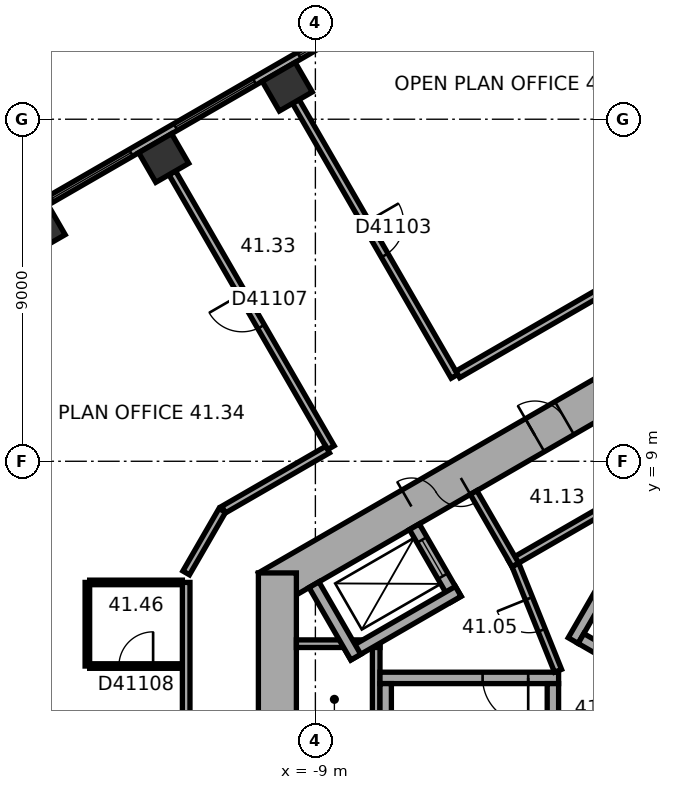
"""IFC4 building model, lengths in metres.
Left out: names, types, materials, properties, quantities, classifications, styles, units other than length and angle.
Written with IfcOpenShell. Run it as: python <this file> out.ifc"""

import sys

from ifc_helpers import new_model, si_unit, direction, frame, frame_2d, origin, origin_2d, place, context, subcontext, project, spatial, rectangle, extrude, element, fill, save


model = new_model("IFC4")
c1 = context("Model", 3, precision=1e-05, world=origin(), true_north=direction((0.0, 1.0)))
c2 = subcontext(c1, "Body", "Model", "MODEL_VIEW")
j1 = project(units=[si_unit("LENGTHUNIT", "METRE"), si_unit("PLANEANGLEUNIT", "RADIAN")], contexts=[c1])
p1 = place(None, origin())
s1 = spatial("IfcSite", under=j1, at=p1, CompositionType="ELEMENT")
p2 = place(p1, origin())
s2 = spatial("IfcBuilding", under=s1, at=p2, CompositionType="ELEMENT")
p3 = place(p2, frame((0.0, 0.0, 168.8)))
s3 = spatial("IfcBuildingStorey", under=s2, at=p3, CompositionType="ELEMENT", Elevation=168.8)
for number, where, z_axis, x_axis in (
    (1, (-9.74, 18.856, 0.0), (0.0, 0.0, 1.0), (-0.866, -0.5, 0.0)),
    (2, (-12.991, 16.979, 0.0), (0.0, 0.0, 1.0), (-0.866, -0.5, 0.0)),
    (3, (-16.242, 15.102, 0.0), (0.0, 0.0, 1.0), (-0.866, -0.5, 0.0)),
):
    element("IfcColumn", number, at=place(p3, frame(where, z_axis=z_axis, x_axis=x_axis)), inside=s3, PredefinedType="COLUMN", context=c2, shape_type="SweptSolid", body=[
        extrude(rectangle(XDim=1.0, YDim=0.9, at=origin_2d()), origin(), (0.0, 0.0, 1.0), 3.7),
    ])
p4 = place(p3, frame((0.25, 11.691, 0.0), z_axis=(0.0, 0.0, 1.0), x_axis=(-0.866022616891, -0.50000482701, 0.0)))
e4 = element("IfcWall", 4, at=p4, inside=s3, PredefinedType="SHEAR", context=c2, shape_type="SweptSolid", body=[
    extrude(rectangle(XDim=12.125, YDim=1.0, at=frame_2d((6.062, 0.0))), origin(), (0.0, 0.0, 1.0), 3.7),
])
p5 = place(p4, frame((6.262, 0.0, 0.0)))
e5 = element("IfcOpeningElement", 5, at=p5, cuts=e4, PredefinedType="OPENING", context=c2, shape_type="SweptSolid", body=[
    extrude(rectangle(XDim=1.5, YDim=2.1, at=frame_2d((0.75, 1.05))), frame((0.0, 0.51, 0.0), z_axis=(0.0, -1.0, 0.0), x_axis=(1.0, 0.0, 0.0)), (0.0, 0.0, 1.0), 1.02),
])
p6 = place(p4, frame((3.112, 0.0, 0.0)))
e6 = element("IfcOpeningElement", 6, at=p6, cuts=e4, PredefinedType="OPENING", context=c2, shape_type="SweptSolid", body=[
    extrude(rectangle(XDim=0.9, YDim=2.1, at=frame_2d((0.45, 1.05))), frame((0.0, 0.51, 0.0), z_axis=(0.0, -1.0, 0.0), x_axis=(1.0, 0.0, 0.0)), (0.0, 0.0, 1.0), 1.02),
])
p7 = place(p3, frame((-10.0, 6.062, 0.0), z_axis=(0.0, 0.0, 1.0), x_axis=(0.0, -1.0, 0.0)))
e7 = element("IfcWall", 7, at=p7, inside=s3, PredefinedType="SHEAR", context=c2, shape_type="SweptSolid", body=[
    extrude(rectangle(XDim=12.125, YDim=1.0, at=frame_2d((6.062, 0.0))), origin(), (0.0, 0.0, 1.0), 3.7),
])
p8 = place(p7, frame((5.212, 0.0, 0.0)))
e8 = element("IfcOpeningElement", 8, at=p8, cuts=e7, PredefinedType="OPENING", context=c2, shape_type="SweptSolid", body=[
    extrude(rectangle(XDim=1.1, YDim=2.1, at=frame_2d((0.55, 1.05))), frame((0.0, 0.51, 0.0), z_axis=(0.0, -1.0, 0.0), x_axis=(1.0, 0.0, 0.0)), (0.0, 0.0, 1.0), 1.02),
])
p9 = place(p7, frame((7.812, 0.0, 0.0)))
e9 = element("IfcOpeningElement", 9, at=p9, cuts=e7, PredefinedType="OPENING", context=c2, shape_type="SweptSolid", body=[
    extrude(rectangle(XDim=1.1, YDim=2.1, at=frame_2d((0.55, 1.05))), frame((0.0, 0.51, 0.0), z_axis=(0.0, -1.0, 0.0), x_axis=(1.0, 0.0, 0.0)), (0.0, 0.0, 1.0), 1.02),
])
p10 = place(p3, frame((-2.961, 23.405, 0.0), z_axis=(0.0, 0.0, 1.0), x_axis=(-0.866023315909, -0.500003616288, 0.0)))
e10 = element("IfcWall", 10, at=p10, inside=s3, PredefinedType="STANDARD", context=c2, shape_type="SweptSolid", body=[
    extrude(rectangle(XDim=20.044, YDim=0.2, at=frame_2d((10.022, 0.0))), origin(), (0.0, 0.0, 1.0), 3.7),
])
p11 = place(p10, frame((1.314, 0.0, 0.9)))
e11 = element("IfcOpeningElement", 11, at=p11, cuts=e10, PredefinedType="OPENING", context=c2, shape_type="SweptSolid", body=[
    extrude(rectangle(XDim=2.4, YDim=2.0, at=frame_2d((1.2, 1.0))), frame((0.0, 0.11, 0.0), z_axis=(0.0, -1.0, 0.0), x_axis=(1.0, 0.0, 0.0)), (0.0, 0.0, 1.0), 0.22),
])
p12 = place(p10, frame((5.069, 0.0, 0.9)))
e12 = element("IfcOpeningElement", 12, at=p12, cuts=e10, PredefinedType="OPENING", context=c2, shape_type="SweptSolid", body=[
    extrude(rectangle(XDim=2.4, YDim=2.0, at=frame_2d((1.2, 1.0))), frame((0.0, 0.11, 0.0), z_axis=(0.0, -1.0, 0.0), x_axis=(1.0, 0.0, 0.0)), (0.0, 0.0, 1.0), 0.22),
])
p13 = place(p10, frame((8.823, 0.0, 0.9)))
e13 = element("IfcOpeningElement", 13, at=p13, cuts=e10, PredefinedType="OPENING", context=c2, shape_type="SweptSolid", body=[
    extrude(rectangle(XDim=2.4, YDim=2.0, at=frame_2d((1.2, 1.0))), frame((0.0, 0.11, 0.0), z_axis=(0.0, -1.0, 0.0), x_axis=(1.0, 0.0, 0.0)), (0.0, 0.0, 1.0), 0.22),
])
p14 = place(p10, frame((12.577, 0.0, 0.9)))
e14 = element("IfcOpeningElement", 14, at=p14, cuts=e10, PredefinedType="OPENING", context=c2, shape_type="SweptSolid", body=[
    extrude(rectangle(XDim=2.4, YDim=2.0, at=frame_2d((1.2, 1.0))), frame((0.0, 0.11, 0.0), z_axis=(0.0, -1.0, 0.0), x_axis=(1.0, 0.0, 0.0)), (0.0, 0.0, 1.0), 0.22),
])
p15 = place(p10, frame((16.331, 0.0, 0.9)))
e15 = element("IfcOpeningElement", 15, at=p15, cuts=e10, PredefinedType="OPENING", context=c2, shape_type="SweptSolid", body=[
    extrude(rectangle(XDim=2.4, YDim=2.0, at=frame_2d((1.2, 1.0))), frame((0.0, 0.11, 0.0), z_axis=(0.0, -1.0, 0.0), x_axis=(1.0, 0.0, 0.0)), (0.0, 0.0, 1.0), 0.22),
])
p16 = place(p3, frame((0.803, 9.009, 0.0), z_axis=(0.0, 0.0, 1.0), x_axis=(-0.866028230842, -0.499995103361, 0.0)))
e16 = element("IfcWall", 16, at=p16, inside=s3, PredefinedType="PARTITIONING", context=c2, shape_type="SweptSolid", body=[
    extrude(rectangle(XDim=5.4, YDim=0.2, at=frame_2d((2.7, 0.0))), origin(), (0.0, 0.0, 1.0), 3.42),
])
p17 = place(p3, frame((-3.737, 6.272, 0.0), z_axis=(0.0, 0.0, 1.0), x_axis=(-0.50002983664, 0.866008176907, 0.0)))
e17 = element("IfcWall", 17, at=p17, inside=s3, PredefinedType="PARTITIONING", context=c2, shape_type="SweptSolid", body=[
    extrude(rectangle(XDim=2.2, YDim=0.2, at=frame_2d((1.1, 0.0))), origin(), (0.0, 0.0, 1.0), 3.42),
])
p18 = place(p3, frame((-7.4, 4.3, 0.0), z_axis=(0.0, 0.0, 1.0), x_axis=(0.0, -1.0, 0.0)))
e18 = element("IfcWall", 18, at=p18, inside=s3, PredefinedType="PARTITIONING", context=c2, shape_type="SweptSolid", body=[
    extrude(rectangle(XDim=8.0, YDim=0.2, at=frame_2d((4.0, 0.0))), origin(), (0.0, 0.0, 1.0), 3.42),
])
p19 = place(p3, frame((-7.3, 4.2, 0.0), z_axis=(0.0, 0.0, 1.0), x_axis=(-1.0, 0.0, 0.0)))
e19 = element("IfcWall", 19, at=p19, inside=s3, PredefinedType="PARTITIONING", context=c2, shape_type="SweptSolid", body=[
    extrude(rectangle(XDim=2.2, YDim=0.2, at=frame_2d((1.1, 0.0))), origin(), (0.0, 0.0, 1.0), 3.42),
])
p20 = place(p3, frame((-2.216, 4.282, 0.0), z_axis=(0.0, 0.0, 1.0), x_axis=(0.499977259774, 0.866038532462, 0.0)))
e20 = element("IfcWall", 20, at=p20, inside=s3, PredefinedType="SHEAR", context=c2, shape_type="SweptSolid", body=[
    extrude(rectangle(XDim=4.7, YDim=0.3, at=frame_2d((2.35, 0.0))), origin(), (0.0, 0.0, 1.0), 3.42),
])
p21 = place(p3, frame((4.103, 0.807, 0.0), z_axis=(0.0, 0.0, 1.0), x_axis=(-0.866027801685, 0.499995846692, 0.0)))
e21 = element("IfcWall", 21, at=p21, inside=s3, PredefinedType="SHEAR", context=c2, shape_type="SweptSolid", body=[
    extrude(rectangle(XDim=7.06, YDim=0.3, at=frame_2d((3.53, 0.0))), origin(), (0.0, 0.0, 1.0), 3.42),
])
p22 = place(p3, frame((-2.6, 3.3, 0.0), z_axis=(0.0, 0.0, 1.0), x_axis=(-1.0, 0.0, 0.0)))
e22 = element("IfcWall", 22, at=p22, inside=s3, PredefinedType="SHEAR", context=c2, shape_type="SweptSolid", body=[
    extrude(rectangle(XDim=4.7, YDim=0.3, at=frame_2d((2.35, 0.0))), origin(), (0.0, 0.0, 1.0), 3.42),
])
p23 = place(p22, frame((0.8, 0.0, 0.0)))
e23 = element("IfcOpeningElement", 23, at=p23, cuts=e22, PredefinedType="OPENING", context=c2, shape_type="SweptSolid", body=[
    extrude(rectangle(XDim=1.2, YDim=2.1, at=frame_2d((0.6, 1.05))), frame((0.0, 0.16, 0.0), z_axis=(0.0, -1.0, 0.0), x_axis=(1.0, 0.0, 0.0)), (0.0, 0.0, 1.0), 0.32),
])
for number, where, z_axis, x_axis in (
    (24, (-2.75, 3.15, 0.0), (0.0, 0.0, 1.0), (0.0, -1.0, 0.0)),
    (25, (-7.15, 3.15, 0.0), (0.0, 0.0, 1.0), (0.0, -1.0, 0.0)),
):
    element("IfcWall", number, at=place(p3, frame(where, z_axis=z_axis, x_axis=x_axis)), inside=s3, PredefinedType="SHEAR", context=c2, shape_type="SweptSolid", body=[
        extrude(rectangle(XDim=7.06, YDim=0.3, at=frame_2d((3.53, 0.0))), origin(), (0.0, 0.0, 1.0), 3.42),
    ])
p24 = place(p3, frame((-5.295, 5.372, 0.0), z_axis=(0.0, 0.0, 1.0), x_axis=(-0.500077893725, 0.86598042715, 0.0)))
e26 = element("IfcWall", 26, at=p24, inside=s3, PredefinedType="SHEAR", context=c2, shape_type="SweptSolid", body=[
    extrude(rectangle(XDim=2.2, YDim=0.3, at=frame_2d((1.1, 0.0))), origin(), (0.0, 0.0, 1.0), 3.42),
])
p25 = place(p24, frame((0.7, 0.0, 0.0)))
e27 = element("IfcOpeningElement", 27, at=p25, cuts=e26, PredefinedType="OPENING", context=c2, shape_type="SweptSolid", body=[
    extrude(rectangle(XDim=1.1, YDim=2.1, at=frame_2d((0.55, 1.05))), frame((0.0, 0.16, 0.0), z_axis=(0.0, -1.0, 0.0), x_axis=(1.0, 0.0, 0.0)), (0.0, 0.0, 1.0), 0.32),
])
p26 = place(p3, frame((-5.24, 5.577, 0.0), z_axis=(0.0, 0.0, 1.0), x_axis=(-0.866014461049, -0.500018952895, 0.0)))
e28 = element("IfcWall", 28, at=p26, inside=s3, PredefinedType="SHEAR", context=c2, shape_type="SweptSolid", body=[
    extrude(rectangle(XDim=3.35, YDim=0.3, at=frame_2d((1.675, 0.0))), origin(), (0.0, 0.0, 1.0), 3.42),
])
p27 = place(p3, frame((-7.937, 3.847, 0.0), z_axis=(0.0, 0.0, 1.0), x_axis=(-0.50002983664, 0.866008176907, 0.0)))
e29 = element("IfcWall", 29, at=p27, inside=s3, PredefinedType="SHEAR", context=c2, shape_type="SweptSolid", body=[
    extrude(rectangle(XDim=2.2, YDim=0.3, at=frame_2d((1.1, 0.0))), origin(), (0.0, 0.0, 1.0), 3.42),
])
p28 = place(p3, frame((-2.615, 3.487, 0.0), z_axis=(0.0, 0.0, 1.0), x_axis=(-0.373576831041, 0.92759924068, 0.0)))
e30 = element("IfcWall", 30, at=p28, inside=s3, PredefinedType="PARTITIONING", context=c2, shape_type="SweptSolid", body=[
    extrude(rectangle(XDim=3.002, YDim=0.2, at=frame_2d((1.501, 0.0))), origin(), (0.0, 0.0, 1.0), 3.42),
])
p29 = place(p28, frame((1.15, 0.0, 0.0)))
e31 = element("IfcOpeningElement", 31, at=p29, cuts=e30, PredefinedType="OPENING", context=c2, shape_type="SweptSolid", body=[
    extrude(rectangle(XDim=0.9, YDim=2.1, at=frame_2d((0.45, 1.05))), frame((0.0, 0.11, 0.0), z_axis=(0.0, -1.0, 0.0), x_axis=(1.0, 0.0, 0.0)), (0.0, 0.0, 1.0), 0.22),
])
p30 = place(p3, frame((-15.0, 3.612, 0.0), z_axis=(0.0, 0.0, 1.0), x_axis=(0.0, 1.0, 0.0)))
e32 = element("IfcWall", 32, at=p30, inside=s3, PredefinedType="PARTITIONING", context=c2, shape_type="SweptSolid", body=[
    extrude(rectangle(XDim=2.2, YDim=0.12, at=frame_2d((1.1, 0.0))), origin(), (0.0, 0.0, 1.0), 3.42),
])
p31 = place(p3, frame((-14.94, 5.812, 0.0), z_axis=(0.0, 0.0, 1.0), x_axis=(1.0, 0.0, 0.0)))
e33 = element("IfcWall", 33, at=p31, inside=s3, PredefinedType="PARTITIONING", context=c2, shape_type="SweptSolid", body=[
    extrude(rectangle(XDim=2.44, YDim=0.12, at=frame_2d((1.22, 0.0))), origin(), (0.0, 0.0, 1.0), 3.42),
])
p32 = place(p3, frame((-12.766, 16.589, 0.0), z_axis=(0.0, 0.0, 1.0), x_axis=(0.500010139422, -0.866019549707, 0.0)))
e34 = element("IfcWall", 34, at=p32, inside=s3, PredefinedType="PARTITIONING", context=c2, shape_type="SweptSolid", body=[
    extrude(rectangle(XDim=8.35, YDim=0.2, at=frame_2d((4.175, 0.0))), origin(), (0.0, 0.0, 1.0), 3.42),
])
p33 = place(p32, frame((3.675, 0.0, 0.0)))
e35 = element("IfcOpeningElement", 35, at=p33, cuts=e34, PredefinedType="OPENING", context=c2, shape_type="SweptSolid", body=[
    extrude(rectangle(XDim=1.0, YDim=2.1, at=frame_2d((0.5, 1.05))), frame((0.0, 0.11, 0.0), z_axis=(0.0, -1.0, 0.0), x_axis=(1.0, 0.0, 0.0)), (0.0, 0.0, 1.0), 0.22),
])
p34 = place(p3, frame((-12.5, 3.612, 0.0), z_axis=(0.0, 0.0, 1.0), x_axis=(-1.0, 0.0, 0.0)))
e36 = element("IfcWall", 36, at=p34, inside=s3, PredefinedType="PARTITIONING", context=c2, shape_type="SweptSolid", body=[
    extrude(rectangle(XDim=2.44, YDim=0.12, at=frame_2d((1.22, 0.0))), origin(), (0.0, 0.0, 1.0), 3.42),
])
p35 = place(p34, frame((0.77, 0.0, 0.0)))
e37 = element("IfcOpeningElement", 37, at=p35, cuts=e36, PredefinedType="OPENING", context=c2, shape_type="SweptSolid", body=[
    extrude(rectangle(XDim=0.9, YDim=2.1, at=frame_2d((0.45, 1.05))), frame((0.0, 0.07, 0.0), z_axis=(0.0, -1.0, 0.0), x_axis=(1.0, 0.0, 0.0)), (0.0, 0.0, 1.0), 0.14),
])
p36 = place(p3, frame((-12.4, 5.812, 0.0), z_axis=(0.0, 0.0, 1.0), x_axis=(0.0, -1.0, 0.0)))
e38 = element("IfcWall", 38, at=p36, inside=s3, PredefinedType="PARTITIONING", context=c2, shape_type="SweptSolid", body=[
    extrude(rectangle(XDim=3.611, YDim=0.2, at=frame_2d((1.806, 0.0))), origin(), (0.0, 0.0, 1.0), 3.42),
])
p37 = place(p3, frame((-11.45, 7.708, 0.0), z_axis=(0.0, 0.0, 1.0), x_axis=(-0.500022797313, -0.86601224135, 0.0)))
e39 = element("IfcWall", 39, at=p37, inside=s3, PredefinedType="PARTITIONING", context=c2, shape_type="SweptSolid", body=[
    extrude(rectangle(XDim=1.9, YDim=0.2, at=frame_2d((0.95, 0.0))), origin(), (0.0, 0.0, 1.0), 3.42),
])
p38 = place(p3, frame((-9.515, 18.466, 0.0), z_axis=(0.0, 0.0, 1.0), x_axis=(0.500010139422, -0.866019549707, 0.0)))
e40 = element("IfcWall", 40, at=p38, inside=s3, PredefinedType="PARTITIONING", context=c2, shape_type="SweptSolid", body=[
    extrude(rectangle(XDim=8.35, YDim=0.2, at=frame_2d((4.175, 0.0))), origin(), (0.0, 0.0, 1.0), 2.87),
])
p39 = place(p38, frame((3.675, 0.0, 0.0)))
e41 = element("IfcOpeningElement", 41, at=p39, cuts=e40, PredefinedType="OPENING", context=c2, shape_type="SweptSolid", body=[
    extrude(rectangle(XDim=1.0, YDim=2.1, at=frame_2d((0.5, 1.05))), frame((0.0, 0.11, 0.0), z_axis=(0.0, -1.0, 0.0), x_axis=(1.0, 0.0, 0.0)), (0.0, 0.0, 1.0), 0.22),
])
p40 = place(p3, frame((-8.678, 9.308, 0.0), z_axis=(0.0, 0.0, 1.0), x_axis=(-0.866000359435, -0.500043375578, 0.0)))
e42 = element("IfcWall", 42, at=p40, inside=s3, PredefinedType="PARTITIONING", context=c2, shape_type="SweptSolid", body=[
    extrude(rectangle(XDim=3.161, YDim=0.2, at=frame_2d((1.581, 0.0))), origin(), (0.0, 0.0, 1.0), 3.42),
])
p41 = place(p3, frame((-0.95, 13.77, 0.0), z_axis=(0.0, 0.0, 1.0), x_axis=(-0.866036689987, -0.499980451214, 0.0)))
e43 = element("IfcWall", 43, at=p41, inside=s3, PredefinedType="PARTITIONING", context=c2, shape_type="SweptSolid", body=[
    extrude(rectangle(XDim=4.969, YDim=0.2, at=frame_2d((2.485, 0.0))), origin(), (0.0, 0.0, 1.0), 3.42),
])
p42 = place(p12, origin())
e44 = element("IfcWindow", 44, at=p42, inside=s3, PartitioningType="SINGLE_PANEL", PredefinedType="WINDOW", context=c2, shape_type="SweptSolid", body=[
    extrude(rectangle(XDim=2.4, YDim=2.0, at=frame_2d((1.2, 1.0))), frame((0.0, 0.03, 0.0), z_axis=(0.0, -1.0, 0.0), x_axis=(1.0, 0.0, 0.0)), (0.0, 0.0, 1.0), 0.06),
])
fill(e12, e44)
p43 = place(p13, origin())
e45 = element("IfcWindow", 45, at=p43, inside=s3, PartitioningType="SINGLE_PANEL", PredefinedType="WINDOW", context=c2, shape_type="SweptSolid", body=[
    extrude(rectangle(XDim=2.4, YDim=2.0, at=frame_2d((1.2, 1.0))), frame((0.0, 0.03, 0.0), z_axis=(0.0, -1.0, 0.0), x_axis=(1.0, 0.0, 0.0)), (0.0, 0.0, 1.0), 0.06),
])
fill(e13, e45)
p44 = place(p14, origin())
e46 = element("IfcWindow", 46, at=p44, inside=s3, PartitioningType="SINGLE_PANEL", PredefinedType="WINDOW", context=c2, shape_type="SweptSolid", body=[
    extrude(rectangle(XDim=2.4, YDim=2.0, at=frame_2d((1.2, 1.0))), frame((0.0, 0.03, 0.0), z_axis=(0.0, -1.0, 0.0), x_axis=(1.0, 0.0, 0.0)), (0.0, 0.0, 1.0), 0.06),
])
fill(e14, e46)
p45 = place(p5, origin())
e47 = element("IfcDoor", 47, at=p45, inside=s3, OperationType="DOUBLE_DOOR_SINGLE_SWING", PredefinedType="DOOR", context=c2, shape_type="SweptSolid", body=[
    extrude(rectangle(XDim=1.5, YDim=2.1, at=frame_2d((0.75, 1.05))), frame((0.0, 0.025, 0.0), z_axis=(0.0, -1.0, 0.0), x_axis=(1.0, 0.0, 0.0)), (0.0, 0.0, 1.0), 0.05),
])
fill(e5, e47)
p46 = place(p23, origin())
e48 = element("IfcDoor", 48, at=p46, inside=s3, OperationType="SINGLE_SWING_RIGHT", PredefinedType="DOOR", context=c2, shape_type="SweptSolid", body=[
    extrude(rectangle(XDim=1.2, YDim=2.1, at=frame_2d((0.6, 1.05))), frame((0.0, 0.025, 0.0), z_axis=(0.0, -1.0, 0.0), x_axis=(1.0, 0.0, 0.0)), (0.0, 0.0, 1.0), 0.05),
])
fill(e23, e48)
p47 = place(p29, origin())
e49 = element("IfcDoor", 49, at=p47, inside=s3, OperationType="SINGLE_SWING_LEFT", PredefinedType="DOOR", context=c2, shape_type="SweptSolid", body=[
    extrude(rectangle(XDim=0.9, YDim=2.1, at=frame_2d((0.45, 1.05))), frame((0.0, 0.025, 0.0), z_axis=(0.0, -1.0, 0.0), x_axis=(1.0, 0.0, 0.0)), (0.0, 0.0, 1.0), 0.05),
])
fill(e31, e49)
p48 = place(p6, origin())
e50 = element("IfcDoor", 50, at=p48, inside=s3, OperationType="SINGLE_SWING_LEFT", PredefinedType="DOOR", context=c2, shape_type="SweptSolid", body=[
    extrude(rectangle(XDim=0.9, YDim=2.1, at=frame_2d((0.45, 1.05))), frame((0.0, 0.025, 0.0), z_axis=(0.0, -1.0, 0.0), x_axis=(1.0, 0.0, 0.0)), (0.0, 0.0, 1.0), 0.05),
])
fill(e6, e50)
p49 = place(p25, origin())
e51 = element("IfcDoor", 51, at=p49, inside=s3, OperationType="DOUBLE_DOOR_SLIDING", PredefinedType="DOOR", context=c2, shape_type="SweptSolid", body=[
    extrude(rectangle(XDim=1.1, YDim=2.1, at=frame_2d((0.55, 1.05))), frame((0.0, 0.025, 0.0), z_axis=(0.0, -1.0, 0.0), x_axis=(1.0, 0.0, 0.0)), (0.0, 0.0, 1.0), 0.05),
])
fill(e27, e51)
p50 = place(p39, origin())
e52 = element("IfcDoor", 52, at=p50, inside=s3, OperationType="SINGLE_SWING_LEFT", PredefinedType="DOOR", context=c2, shape_type="SweptSolid", body=[
    extrude(rectangle(XDim=1.0, YDim=2.1, at=frame_2d((0.5, 1.05))), frame((0.0, 0.025, 0.0), z_axis=(0.0, -1.0, 0.0), x_axis=(1.0, 0.0, 0.0)), (0.0, 0.0, 1.0), 0.05),
])
fill(e41, e52)
p51 = place(p33, origin())
e53 = element("IfcDoor", 53, at=p51, inside=s3, OperationType="SINGLE_SWING_LEFT", PredefinedType="DOOR", context=c2, shape_type="SweptSolid", body=[
    extrude(rectangle(XDim=1.0, YDim=2.1, at=frame_2d((0.5, 1.05))), frame((0.0, 0.025, 0.0), z_axis=(0.0, -1.0, 0.0), x_axis=(1.0, 0.0, 0.0)), (0.0, 0.0, 1.0), 0.05),
])
fill(e35, e53)
p52 = place(p35, origin())
e54 = element("IfcDoor", 54, at=p52, inside=s3, OperationType="SINGLE_SWING_LEFT", PredefinedType="DOOR", context=c2, shape_type="SweptSolid", body=[
    extrude(rectangle(XDim=0.9, YDim=2.1, at=frame_2d((0.45, 1.05))), frame((0.0, 0.025, 0.0), z_axis=(0.0, -1.0, 0.0), x_axis=(1.0, 0.0, 0.0)), (0.0, 0.0, 1.0), 0.05),
])
fill(e37, e54)
save(model, sys.argv[1])
